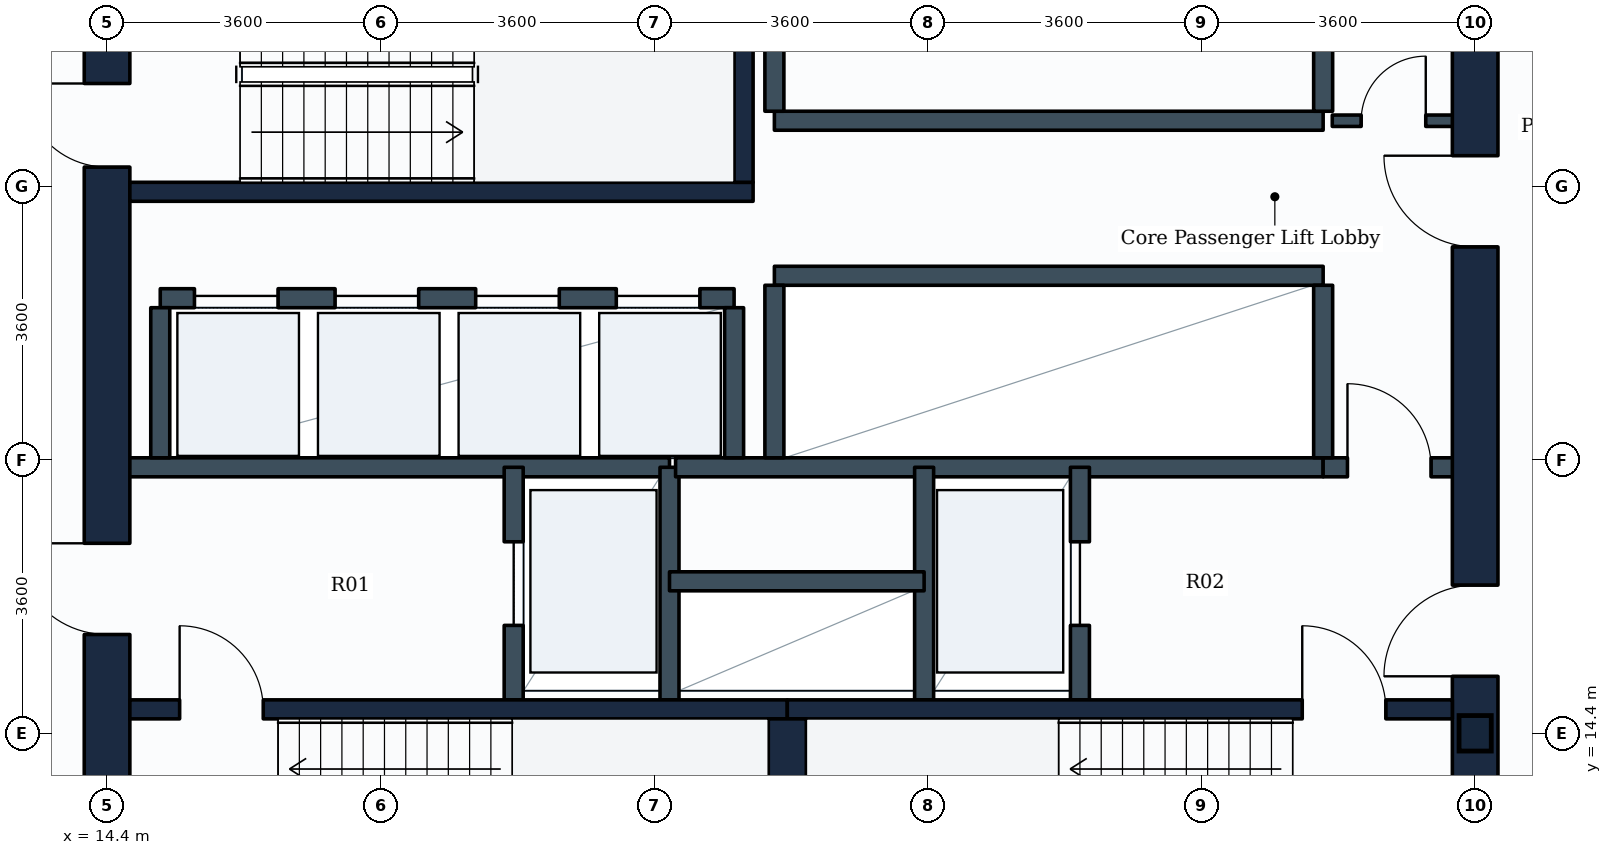
"""IFC4 building model, lengths in metres.
Left out: names, types, materials, properties, quantities, classifications, styles, units other than length and angle.
Written with IfcOpenShell. Run it as: python <this file> out.ifc"""

import sys

from ifc_helpers import new_model, si_unit, direction, frame, frame_2d, origin, origin_2d, place, context, subcontext, project, spatial, rectangle, i_section, extrude, element, fill, save


model = new_model("IFC4")
c1 = context("Model", 3, precision=1e-05, world=origin(), true_north=direction((0.0, 1.0)))
c2 = subcontext(c1, "Body", "Model", "MODEL_VIEW")
j1 = project(units=[si_unit("LENGTHUNIT", "METRE"), si_unit("PLANEANGLEUNIT", "RADIAN")], contexts=[c1])
p1 = place(None, origin())
s1 = spatial("IfcSite", under=j1, at=p1, CompositionType="ELEMENT")
p2 = place(p1, origin())
s2 = spatial("IfcBuilding", under=s1, at=p2, CompositionType="ELEMENT")
p3 = place(p2, frame((0.0, 0.0, 95.7)))
s3 = spatial("IfcBuildingStorey", under=s2, at=p3, CompositionType="ELEMENT", Elevation=95.7)
p4 = place(p3, frame((32.4, 14.4, 0.0), z_axis=(0.0, 0.0, 1.0), x_axis=(1.0, 0.0, 0.0)))
e1 = element("IfcColumn", 1, at=p4, inside=s3, PredefinedType="COLUMN", context=c2, shape_type="SweptSolid", body=[
    extrude(i_section(OverallWidth=0.424, OverallDepth=0.467, WebThickness=0.033, FlangeThickness=0.053, FilletRadius=0.015, at=origin_2d()), origin(), (0.0, 0.0, 1.0), 3.9),
])
p5 = place(p3, frame((14.4, 10.8, 0.0), z_axis=(0.0, 0.0, 1.0), x_axis=(0.0, 1.0, 0.0)))
e2 = element("IfcWall", 2, at=p5, inside=s3, PredefinedType="SHEAR", context=c2, shape_type="SweptSolid", body=[
    extrude(rectangle(XDim=14.4, YDim=0.6, at=frame_2d((7.2, 0.0))), origin(), (0.0, 0.0, 1.0), 3.65),
])
p6 = place(p5, frame((11.05, 0.0, 0.0)))
e3 = element("IfcOpeningElement", 3, at=p6, cuts=e2, PredefinedType="OPENING", context=c2, shape_type="SweptSolid", body=[
    extrude(rectangle(XDim=1.1, YDim=2.1, at=frame_2d((0.55, 1.05))), frame((0.0, 0.31, 0.0), z_axis=(0.0, -1.0, 0.0), x_axis=(1.0, 0.0, 0.0)), (0.0, 0.0, 1.0), 0.62),
])
p7 = place(p5, frame((4.9, 0.0, 0.0)))
e4 = element("IfcOpeningElement", 4, at=p7, cuts=e2, PredefinedType="OPENING", context=c2, shape_type="SweptSolid", body=[
    extrude(rectangle(XDim=1.2, YDim=2.1, at=frame_2d((0.6, 1.05))), frame((0.0, 0.31, 0.0), z_axis=(0.0, -1.0, 0.0), x_axis=(1.0, 0.0, 0.0)), (0.0, 0.0, 1.0), 0.62),
])
p8 = place(p3, frame((32.4, 10.8, 0.0), z_axis=(0.0, 0.0, 1.0), x_axis=(0.0, 1.0, 0.0)))
e5 = element("IfcWall", 5, at=p8, inside=s3, PredefinedType="SHEAR", context=c2, shape_type="SweptSolid", body=[
    extrude(rectangle(XDim=14.4, YDim=0.6, at=frame_2d((7.2, 0.0))), origin(), (0.0, 0.0, 1.0), 3.65),
])
p9 = place(p8, frame((4.35, 0.0, 0.0)))
e6 = element("IfcOpeningElement", 6, at=p9, cuts=e5, PredefinedType="OPENING", context=c2, shape_type="SweptSolid", body=[
    extrude(rectangle(XDim=1.2, YDim=2.1, at=frame_2d((0.6, 1.05))), frame((0.0, 0.31, 0.0), z_axis=(0.0, -1.0, 0.0), x_axis=(1.0, 0.0, 0.0)), (0.0, 0.0, 1.0), 0.62),
])
p10 = place(p8, frame((10.0, 0.0, 0.0)))
e7 = element("IfcOpeningElement", 7, at=p10, cuts=e5, PredefinedType="OPENING", context=c2, shape_type="SweptSolid", body=[
    extrude(rectangle(XDim=1.2, YDim=2.1, at=frame_2d((0.6, 1.05))), frame((0.0, 0.31, 0.0), z_axis=(0.0, -1.0, 0.0), x_axis=(1.0, 0.0, 0.0)), (0.0, 0.0, 1.0), 0.62),
])
p11 = place(p3, frame((14.7, 14.715, 0.0), z_axis=(0.0, 0.0, 1.0), x_axis=(1.0, 0.0, 0.0)))
e8 = element("IfcWall", 8, at=p11, inside=s3, PredefinedType="SHEAR", context=c2, shape_type="SweptSolid", body=[
    extrude(rectangle(XDim=8.65, YDim=0.25, at=frame_2d((4.325, 0.0))), origin(), (0.0, 0.0, 1.0), 3.65),
])
p12 = place(p11, frame((0.655, 0.0, 0.0)))
e9 = element("IfcOpeningElement", 9, at=p12, cuts=e8, PredefinedType="OPENING", context=c2, shape_type="SweptSolid", body=[
    extrude(rectangle(XDim=1.1, YDim=2.1, at=frame_2d((0.55, 1.05))), frame((0.0, 0.135, 0.0), z_axis=(0.0, -1.0, 0.0), x_axis=(1.0, 0.0, 0.0)), (0.0, 0.0, 1.0), 0.27),
])
p13 = place(p3, frame((23.35, 14.715, 0.0), z_axis=(0.0, 0.0, 1.0), x_axis=(1.0, 0.0, 0.0)))
e10 = element("IfcWall", 10, at=p13, inside=s3, PredefinedType="SHEAR", context=c2, shape_type="SweptSolid", body=[
    extrude(rectangle(XDim=8.75, YDim=0.25, at=frame_2d((4.375, 0.0))), origin(), (0.0, 0.0, 1.0), 3.65),
])
p14 = place(p13, frame((6.775, 0.0, 0.0)))
e11 = element("IfcOpeningElement", 11, at=p14, cuts=e10, PredefinedType="OPENING", context=c2, shape_type="SweptSolid", body=[
    extrude(rectangle(XDim=1.1, YDim=2.1, at=frame_2d((0.55, 1.05))), frame((0.0, 0.135, 0.0), z_axis=(0.0, -1.0, 0.0), x_axis=(1.0, 0.0, 0.0)), (0.0, 0.0, 1.0), 0.27),
])
p15 = place(p3, frame((23.35, 11.75, 0.0), z_axis=(0.0, 0.0, 1.0), x_axis=(0.0, 1.0, 0.0)))
e12 = element("IfcWall", 12, at=p15, inside=s3, PredefinedType="SHEAR", context=c2, shape_type="SweptSolid", body=[
    extrude(rectangle(XDim=2.84, YDim=0.5, at=frame_2d((1.42, 0.0))), origin(), (0.0, 0.0, 1.0), 3.65),
])
p16 = place(p3, frame((14.7, 21.525, 0.0), z_axis=(0.0, 0.0, 1.0), x_axis=(1.0, 0.0, 0.0)))
e13 = element("IfcWall", 13, at=p16, inside=s3, PredefinedType="SHEAR", context=c2, shape_type="SweptSolid", body=[
    extrude(rectangle(XDim=8.2, YDim=0.25, at=frame_2d((4.1, 0.0))), origin(), (0.0, 0.0, 1.0), 3.65),
])
p17 = place(p3, frame((22.775, 21.65, 0.0), z_axis=(0.0, 0.0, 1.0), x_axis=(0.0, 1.0, 0.0)))
e14 = element("IfcWall", 14, at=p17, inside=s3, PredefinedType="SHEAR", context=c2, shape_type="SweptSolid", body=[
    extrude(rectangle(XDim=2.84, YDim=0.25, at=frame_2d((1.42, 0.0))), origin(), (0.0, 0.0, 1.0), 3.65),
])
p18 = place(p3, frame((14.65, 17.9, 0.0), z_axis=(0.0, 0.0, 1.0), x_axis=(1.0, 0.0, 0.0)))
e15 = element("IfcWall", 15, at=p18, inside=s3, PredefinedType="PARTITIONING", context=c2, shape_type="SweptSolid", body=[
    extrude(rectangle(XDim=7.15, YDim=0.25, at=frame_2d((3.575, 0.0))), origin(), (0.0, 0.0, 1.0), 3.635),
])
p19 = place(p3, frame((19.75, 14.84, 0.0), z_axis=(0.0, 0.0, 1.0), x_axis=(0.0, 1.0, 0.0)))
e16 = element("IfcWall", 16, at=p19, inside=s3, PredefinedType="PARTITIONING", context=c2, shape_type="SweptSolid", body=[
    extrude(rectangle(XDim=3.06, YDim=0.25, at=frame_2d((1.53, 0.0))), origin(), (0.0, 0.0, 1.0), 3.635),
])
p20 = place(p19, frame((0.98, 0.0, 0.0)))
e17 = element("IfcOpeningElement", 17, at=p20, cuts=e16, PredefinedType="OPENING", context=c2, shape_type="SweptSolid", body=[
    extrude(rectangle(XDim=1.1, YDim=2.1, at=frame_2d((0.55, 1.05))), frame((0.0, 0.135, 0.0), z_axis=(0.0, -1.0, 0.0), x_axis=(1.0, 0.0, 0.0)), (0.0, 0.0, 1.0), 0.27),
])
p21 = place(p3, frame((21.8, 14.84, 0.0), z_axis=(0.0, 0.0, 1.0), x_axis=(0.0, 1.0, 0.0)))
e18 = element("IfcWall", 18, at=p21, inside=s3, PredefinedType="PARTITIONING", context=c2, shape_type="SweptSolid", body=[
    extrude(rectangle(XDim=3.06, YDim=0.25, at=frame_2d((1.53, 0.0))), origin(), (0.0, 0.0, 1.0), 3.635),
])
p22 = place(p3, frame((21.88, 17.9, 0.0), z_axis=(0.0, 0.0, 1.0), x_axis=(1.0, 0.0, 0.0)))
e19 = element("IfcWall", 19, at=p22, inside=s3, PredefinedType="PARTITIONING", context=c2, shape_type="SweptSolid", body=[
    extrude(rectangle(XDim=8.52, YDim=0.25, at=frame_2d((4.26, 0.0))), origin(), (0.0, 0.0, 1.0), 3.635),
])
p23 = place(p3, frame((30.4, 17.9, 0.0), z_axis=(0.0, 0.0, 1.0), x_axis=(1.0, 0.0, 0.0)))
e20 = element("IfcWall", 20, at=p23, inside=s3, PredefinedType="PARTITIONING", context=c2, shape_type="SweptSolid", body=[
    extrude(rectangle(XDim=1.75, YDim=0.25, at=frame_2d((0.875, 0.0))), origin(), (0.0, 0.0, 1.0), 3.635),
])
p24 = place(p23, frame((0.32, 0.0, 0.0)))
e21 = element("IfcOpeningElement", 21, at=p24, cuts=e20, PredefinedType="OPENING", context=c2, shape_type="SweptSolid", body=[
    extrude(rectangle(XDim=1.1, YDim=2.1, at=frame_2d((0.55, 1.05))), frame((0.0, 0.135, 0.0), z_axis=(0.0, -1.0, 0.0), x_axis=(1.0, 0.0, 0.0)), (0.0, 0.0, 1.0), 0.27),
])
p25 = place(p3, frame((25.15, 14.84, 0.0), z_axis=(0.0, 0.0, 1.0), x_axis=(0.0, 1.0, 0.0)))
e22 = element("IfcWall", 22, at=p25, inside=s3, PredefinedType="PARTITIONING", context=c2, shape_type="SweptSolid", body=[
    extrude(rectangle(XDim=3.06, YDim=0.25, at=frame_2d((1.53, 0.0))), origin(), (0.0, 0.0, 1.0), 3.635),
])
p26 = place(p3, frame((27.2, 14.84, 0.0), z_axis=(0.0, 0.0, 1.0), x_axis=(0.0, 1.0, 0.0)))
e23 = element("IfcWall", 23, at=p26, inside=s3, PredefinedType="PARTITIONING", context=c2, shape_type="SweptSolid", body=[
    extrude(rectangle(XDim=3.06, YDim=0.25, at=frame_2d((1.53, 0.0))), origin(), (0.0, 0.0, 1.0), 3.635),
])
p27 = place(p26, frame((0.98, 0.0, 0.0)))
e24 = element("IfcOpeningElement", 24, at=p27, cuts=e23, PredefinedType="OPENING", context=c2, shape_type="SweptSolid", body=[
    extrude(rectangle(XDim=1.1, YDim=2.1, at=frame_2d((0.55, 1.05))), frame((0.0, 0.135, 0.0), z_axis=(0.0, -1.0, 0.0), x_axis=(1.0, 0.0, 0.0)), (0.0, 0.0, 1.0), 0.27),
])
p28 = place(p3, frame((21.8, 16.4, 0.0), z_axis=(0.0, 0.0, 1.0), x_axis=(1.0, 0.0, 0.0)))
e25 = element("IfcWall", 25, at=p28, inside=s3, PredefinedType="PARTITIONING", context=c2, shape_type="SweptSolid", body=[
    extrude(rectangle(XDim=3.35, YDim=0.25, at=frame_2d((1.675, 0.0))), origin(), (0.0, 0.0, 1.0), 3.635),
])
p29 = place(p3, frame((15.1, 20.125, 0.0), z_axis=(0.0, 0.0, 1.0), x_axis=(1.0, 0.0, 0.0)))
e26 = element("IfcWall", 26, at=p29, inside=s3, PredefinedType="PARTITIONING", context=c2, shape_type="SweptSolid", body=[
    extrude(rectangle(XDim=7.55, YDim=0.25, at=frame_2d((3.775, 0.0))), origin(), (0.0, 0.0, 1.0), 3.635),
])
p30 = place(p29, frame((0.45, 0.0, 0.0)))
e27 = element("IfcOpeningElement", 27, at=p30, cuts=e26, PredefinedType="OPENING", context=c2, shape_type="SweptSolid", body=[
    extrude(rectangle(XDim=1.1, YDim=2.1, at=frame_2d((0.55, 1.05))), frame((0.0, 0.135, 0.0), z_axis=(0.0, -1.0, 0.0), x_axis=(1.0, 0.0, 0.0)), (0.0, 0.0, 1.0), 0.27),
])
p31 = place(p29, frame((2.3, 0.0, 0.0)))
e28 = element("IfcOpeningElement", 28, at=p31, cuts=e26, PredefinedType="OPENING", context=c2, shape_type="SweptSolid", body=[
    extrude(rectangle(XDim=1.1, YDim=2.1, at=frame_2d((0.55, 1.05))), frame((0.0, 0.135, 0.0), z_axis=(0.0, -1.0, 0.0), x_axis=(1.0, 0.0, 0.0)), (0.0, 0.0, 1.0), 0.27),
])
p32 = place(p29, frame((4.15, 0.0, 0.0)))
e29 = element("IfcOpeningElement", 29, at=p32, cuts=e26, PredefinedType="OPENING", context=c2, shape_type="SweptSolid", body=[
    extrude(rectangle(XDim=1.1, YDim=2.1, at=frame_2d((0.55, 1.05))), frame((0.0, 0.135, 0.0), z_axis=(0.0, -1.0, 0.0), x_axis=(1.0, 0.0, 0.0)), (0.0, 0.0, 1.0), 0.27),
])
p33 = place(p29, frame((6.0, 0.0, 0.0)))
e30 = element("IfcOpeningElement", 30, at=p33, cuts=e26, PredefinedType="OPENING", context=c2, shape_type="SweptSolid", body=[
    extrude(rectangle(XDim=1.1, YDim=2.1, at=frame_2d((0.55, 1.05))), frame((0.0, 0.135, 0.0), z_axis=(0.0, -1.0, 0.0), x_axis=(1.0, 0.0, 0.0)), (0.0, 0.0, 1.0), 0.27),
])
for number, where, z_axis, x_axis in (
    (31, (15.1, 18.025, 0.0), (0.0, 0.0, 1.0), (0.0, 1.0, 0.0)),
    (32, (22.65, 18.025, 0.0), (0.0, 0.0, 1.0), (0.0, 1.0, 0.0)),
):
    element("IfcWall", number, at=place(p3, frame(where, z_axis=z_axis, x_axis=x_axis)), inside=s3, PredefinedType="PARTITIONING", context=c2, shape_type="SweptSolid", body=[
        extrude(rectangle(XDim=1.975, YDim=0.25, at=frame_2d((0.988, 0.0))), origin(), (0.0, 0.0, 1.0), 3.635),
    ])
p34 = place(p3, frame((23.18, 20.42, 0.0), z_axis=(0.0, 0.0, 1.0), x_axis=(1.0, 0.0, 0.0)))
e33 = element("IfcWall", 33, at=p34, inside=s3, PredefinedType="PARTITIONING", context=c2, shape_type="SweptSolid", body=[
    extrude(rectangle(XDim=7.22, YDim=0.25, at=frame_2d((3.61, 0.0))), origin(), (0.0, 0.0, 1.0), 3.635),
])
for number, where, z_axis, x_axis in (
    (34, (23.18, 18.025, 0.0), (0.0, 0.0, 1.0), (0.0, 1.0, 0.0)),
    (35, (30.4, 18.025, 0.0), (0.0, 0.0, 1.0), (0.0, 1.0, 0.0)),
):
    element("IfcWall", number, at=place(p3, frame(where, z_axis=z_axis, x_axis=x_axis)), inside=s3, PredefinedType="PARTITIONING", context=c2, shape_type="SweptSolid", body=[
        extrude(rectangle(XDim=2.27, YDim=0.25, at=frame_2d((1.135, 0.0))), origin(), (0.0, 0.0, 1.0), 3.635),
    ])
p35 = place(p3, frame((23.18, 22.46, 0.0), z_axis=(0.0, 0.0, 1.0), x_axis=(1.0, 0.0, 0.0)))
e36 = element("IfcWall", 36, at=p35, inside=s3, PredefinedType="PARTITIONING", context=c2, shape_type="SweptSolid", body=[
    extrude(rectangle(XDim=7.22, YDim=0.25, at=frame_2d((3.61, 0.0))), origin(), (0.0, 0.0, 1.0), 3.635),
])
for number, where, z_axis, x_axis in (
    (37, (23.18, 22.585, 0.0), (0.0, 0.0, 1.0), (0.0, 1.0, 0.0)),
    (38, (30.4, 22.585, 0.0), (0.0, 0.0, 1.0), (0.0, 1.0, 0.0)),
):
    element("IfcWall", number, at=place(p3, frame(where, z_axis=z_axis, x_axis=x_axis)), inside=s3, PredefinedType="PARTITIONING", context=c2, shape_type="SweptSolid", body=[
        extrude(rectangle(XDim=2.315, YDim=0.25, at=frame_2d((1.157, 0.0))), origin(), (0.0, 0.0, 1.0), 3.635),
    ])
p36 = place(p3, frame((30.52, 22.46, 0.0), z_axis=(0.0, 0.0, 1.0), x_axis=(1.0, 0.0, 0.0)))
e39 = element("IfcWall", 39, at=p36, inside=s3, PredefinedType="PARTITIONING", context=c2, shape_type="SweptSolid", body=[
    extrude(rectangle(XDim=1.63, YDim=0.15, at=frame_2d((0.815, 0.0))), origin(), (0.0, 0.0, 1.0), 3.635),
])
p37 = place(p36, frame((0.38, 0.0, 0.0)))
e40 = element("IfcOpeningElement", 40, at=p37, cuts=e39, PredefinedType="OPENING", context=c2, shape_type="SweptSolid", body=[
    extrude(rectangle(XDim=0.85, YDim=2.1, at=frame_2d((0.425, 1.05))), frame((0.0, 0.085, 0.0), z_axis=(0.0, -1.0, 0.0), x_axis=(1.0, 0.0, 0.0)), (0.0, 0.0, 1.0), 0.17),
])
p38 = place(p12, origin())
e41 = element("IfcDoor", 41, at=p38, inside=s3, OperationType="SINGLE_SWING_LEFT", PredefinedType="DOOR", context=c2, shape_type="SweptSolid", body=[
    extrude(rectangle(XDim=1.1, YDim=2.1, at=frame_2d((0.55, 1.05))), frame((0.0, 0.025, 0.0), z_axis=(0.0, -1.0, 0.0), x_axis=(1.0, 0.0, 0.0)), (0.0, 0.0, 1.0), 0.05),
])
fill(e9, e41)
p39 = place(p14, origin())
e42 = element("IfcDoor", 42, at=p39, inside=s3, OperationType="SINGLE_SWING_LEFT", PredefinedType="DOOR", context=c2, shape_type="SweptSolid", body=[
    extrude(rectangle(XDim=1.1, YDim=2.1, at=frame_2d((0.55, 1.05))), frame((0.0, 0.025, 0.0), z_axis=(0.0, -1.0, 0.0), x_axis=(1.0, 0.0, 0.0)), (0.0, 0.0, 1.0), 0.05),
])
fill(e11, e42)
p40 = place(p6, origin())
e43 = element("IfcDoor", 43, at=p40, inside=s3, OperationType="SINGLE_SWING_RIGHT", PredefinedType="DOOR", context=c2, shape_type="SweptSolid", body=[
    extrude(rectangle(XDim=1.1, YDim=2.1, at=frame_2d((0.55, 1.05))), frame((0.0, 0.025, 0.0), z_axis=(0.0, -1.0, 0.0), x_axis=(1.0, 0.0, 0.0)), (0.0, 0.0, 1.0), 0.05),
])
fill(e3, e43)
p41 = place(p20, origin())
e44 = element("IfcDoor", 44, at=p41, inside=s3, OperationType="SLIDING_TO_LEFT", PredefinedType="DOOR", context=c2, shape_type="SweptSolid", body=[
    extrude(rectangle(XDim=1.1, YDim=2.1, at=frame_2d((0.55, 1.05))), frame((0.0, 0.025, 0.0), z_axis=(0.0, -1.0, 0.0), x_axis=(1.0, 0.0, 0.0)), (0.0, 0.0, 1.0), 0.05),
])
fill(e17, e44)
p42 = place(p27, origin())
e45 = element("IfcDoor", 45, at=p42, inside=s3, OperationType="SLIDING_TO_LEFT", PredefinedType="DOOR", context=c2, shape_type="SweptSolid", body=[
    extrude(rectangle(XDim=1.1, YDim=2.1, at=frame_2d((0.55, 1.05))), frame((0.0, 0.025, 0.0), z_axis=(0.0, -1.0, 0.0), x_axis=(1.0, 0.0, 0.0)), (0.0, 0.0, 1.0), 0.05),
])
fill(e24, e45)
p43 = place(p7, origin())
e46 = element("IfcDoor", 46, at=p43, inside=s3, OperationType="SINGLE_SWING_RIGHT", PredefinedType="DOOR", context=c2, shape_type="SweptSolid", body=[
    extrude(rectangle(XDim=1.2, YDim=2.1, at=frame_2d((0.6, 1.05))), frame((0.0, 0.025, 0.0), z_axis=(0.0, -1.0, 0.0), x_axis=(1.0, 0.0, 0.0)), (0.0, 0.0, 1.0), 0.05),
])
fill(e4, e46)
p44 = place(p9, origin())
e47 = element("IfcDoor", 47, at=p44, inside=s3, OperationType="SINGLE_SWING_LEFT", PredefinedType="DOOR", context=c2, shape_type="SweptSolid", body=[
    extrude(rectangle(XDim=1.2, YDim=2.1, at=frame_2d((0.6, 1.05))), frame((0.0, 0.025, 0.0), z_axis=(0.0, -1.0, 0.0), x_axis=(1.0, 0.0, 0.0)), (0.0, 0.0, 1.0), 0.05),
])
fill(e6, e47)
p45 = place(p24, origin())
e48 = element("IfcDoor", 48, at=p45, inside=s3, OperationType="SINGLE_SWING_LEFT", PredefinedType="DOOR", context=c2, shape_type="SweptSolid", body=[
    extrude(rectangle(XDim=1.1, YDim=2.1, at=frame_2d((0.55, 1.05))), frame((0.0, 0.025, 0.0), z_axis=(0.0, -1.0, 0.0), x_axis=(1.0, 0.0, 0.0)), (0.0, 0.0, 1.0), 0.05),
])
fill(e21, e48)
p46 = place(p30, origin())
e49 = element("IfcDoor", 49, at=p46, inside=s3, OperationType="SLIDING_TO_LEFT", PredefinedType="DOOR", context=c2, shape_type="SweptSolid", body=[
    extrude(rectangle(XDim=1.1, YDim=2.1, at=frame_2d((0.55, 1.05))), frame((0.0, 0.025, 0.0), z_axis=(0.0, -1.0, 0.0), x_axis=(1.0, 0.0, 0.0)), (0.0, 0.0, 1.0), 0.05),
])
fill(e27, e49)
p47 = place(p31, origin())
e50 = element("IfcDoor", 50, at=p47, inside=s3, OperationType="SLIDING_TO_LEFT", PredefinedType="DOOR", context=c2, shape_type="SweptSolid", body=[
    extrude(rectangle(XDim=1.1, YDim=2.1, at=frame_2d((0.55, 1.05))), frame((0.0, 0.025, 0.0), z_axis=(0.0, -1.0, 0.0), x_axis=(1.0, 0.0, 0.0)), (0.0, 0.0, 1.0), 0.05),
])
fill(e28, e50)
p48 = place(p32, origin())
e51 = element("IfcDoor", 51, at=p48, inside=s3, OperationType="SLIDING_TO_LEFT", PredefinedType="DOOR", context=c2, shape_type="SweptSolid", body=[
    extrude(rectangle(XDim=1.1, YDim=2.1, at=frame_2d((0.55, 1.05))), frame((0.0, 0.025, 0.0), z_axis=(0.0, -1.0, 0.0), x_axis=(1.0, 0.0, 0.0)), (0.0, 0.0, 1.0), 0.05),
])
fill(e29, e51)
p49 = place(p33, origin())
e52 = element("IfcDoor", 52, at=p49, inside=s3, OperationType="SLIDING_TO_LEFT", PredefinedType="DOOR", context=c2, shape_type="SweptSolid", body=[
    extrude(rectangle(XDim=1.1, YDim=2.1, at=frame_2d((0.55, 1.05))), frame((0.0, 0.025, 0.0), z_axis=(0.0, -1.0, 0.0), x_axis=(1.0, 0.0, 0.0)), (0.0, 0.0, 1.0), 0.05),
])
fill(e30, e52)
p50 = place(p10, origin())
e53 = element("IfcDoor", 53, at=p50, inside=s3, OperationType="SINGLE_SWING_RIGHT", PredefinedType="DOOR", context=c2, shape_type="SweptSolid", body=[
    extrude(rectangle(XDim=1.2, YDim=2.1, at=frame_2d((0.6, 1.05))), frame((0.0, 0.025, 0.0), z_axis=(0.0, -1.0, 0.0), x_axis=(1.0, 0.0, 0.0)), (0.0, 0.0, 1.0), 0.05),
])
fill(e7, e53)
p51 = place(p37, origin())
e54 = element("IfcDoor", 54, at=p51, inside=s3, OperationType="SINGLE_SWING_RIGHT", PredefinedType="DOOR", context=c2, shape_type="SweptSolid", body=[
    extrude(rectangle(XDim=0.85, YDim=2.1, at=frame_2d((0.425, 1.05))), frame((0.0, 0.025, 0.0), z_axis=(0.0, -1.0, 0.0), x_axis=(1.0, 0.0, 0.0)), (0.0, 0.0, 1.0), 0.05),
])
fill(e40, e54)
save(model, sys.argv[1])
